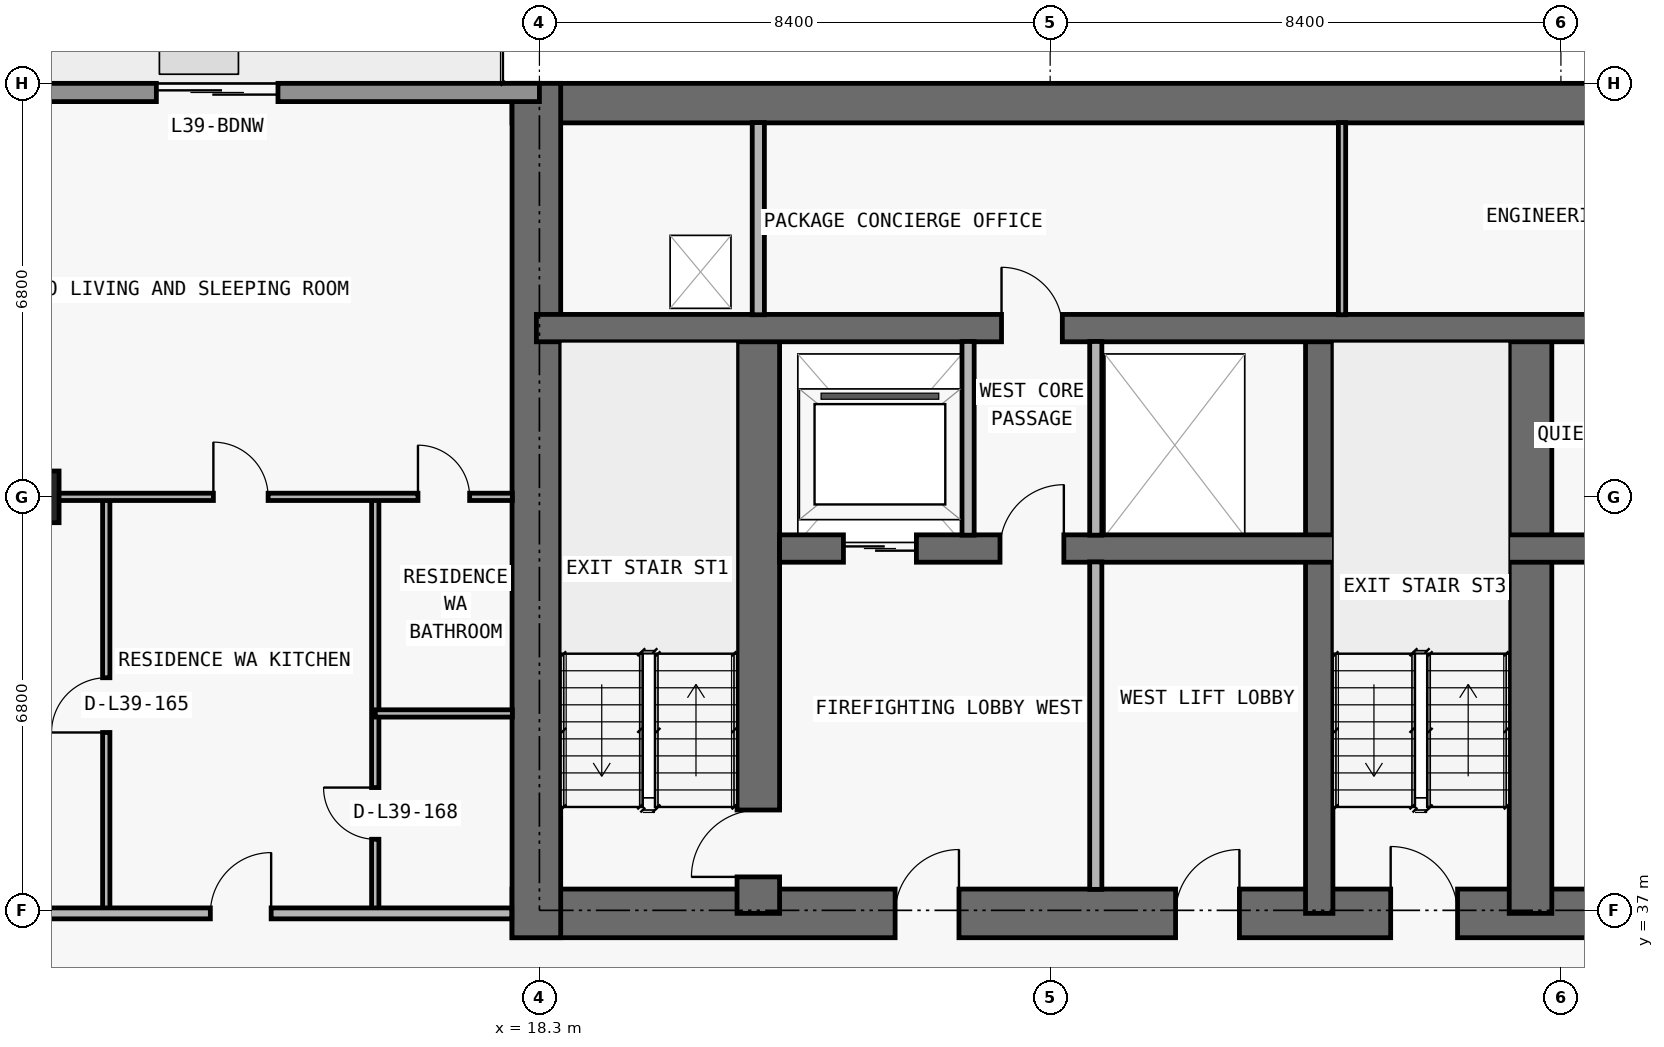
"""IFC4 building model, lengths in metres.
Left out: names, types, materials, properties, quantities, classifications, styles, units other than length and angle.
Written with IfcOpenShell. Run it as: python <this file> out.ifc"""

import sys

from ifc_helpers import new_model, si_unit, direction, frame, frame_2d, origin, origin_2d, place, context, subcontext, project, spatial, rectangle, extrude, element, fill, save


model = new_model("IFC4")
c1 = context("Model", 3, precision=1e-05, world=origin(), true_north=direction((0.0, 1.0)))
c2 = subcontext(c1, "Body", "Model", "MODEL_VIEW")
j1 = project(units=[si_unit("LENGTHUNIT", "METRE"), si_unit("PLANEANGLEUNIT", "RADIAN")], contexts=[c1])
p1 = place(None, origin())
s1 = spatial("IfcSite", under=j1, at=p1, CompositionType="ELEMENT")
p2 = place(p1, origin())
s2 = spatial("IfcBuilding", under=s1, at=p2, CompositionType="ELEMENT")
p3 = place(p2, frame((0.0, 0.0, 142.2)))
s3 = spatial("IfcBuildingStorey", under=s2, at=p3, CompositionType="ELEMENT", Elevation=142.2)
p4 = place(p3, frame((9.9, 43.8, 0.0), z_axis=(0.0, 0.0, 1.0), x_axis=(1.0, 0.0, 0.0)))
e1 = element("IfcColumn", 1, at=p4, inside=s3, PredefinedType="COLUMN", context=c2, shape_type="SweptSolid", body=[
    extrude(rectangle(XDim=1.0, YDim=0.85, at=origin_2d()), origin(), (0.0, 0.0, 1.0), 3.05),
])
p5 = place(p3, frame((17.85, 36.95, 0.0), z_axis=(0.0, 0.0, 1.0), x_axis=(1.0, 0.0, 0.0)))
e2 = element("IfcWall", 2, at=p5, inside=s3, PredefinedType="SHEAR", context=c2, shape_type="SweptSolid", body=[
    extrude(rectangle(XDim=42.1, YDim=0.8, at=frame_2d((21.05, 0.0))), origin(), (0.0, 0.0, 1.0), 3.05),
])
p6 = place(p5, frame((14.45, 0.0, 0.0)))
e3 = element("IfcOpeningElement", 3, at=p6, cuts=e2, PredefinedType="OPENING", context=c2, shape_type="SweptSolid", body=[
    extrude(rectangle(XDim=1.1, YDim=2.15, at=frame_2d((0.55, 1.075))), frame((0.0, 0.41, 0.0), z_axis=(0.0, -1.0, 0.0), x_axis=(1.0, 0.0, 0.0)), (0.0, 0.0, 1.0), 0.82),
])
p7 = place(p5, frame((6.3, 0.0, 0.0)))
e4 = element("IfcOpeningElement", 4, at=p7, cuts=e2, PredefinedType="OPENING", context=c2, shape_type="SweptSolid", body=[
    extrude(rectangle(XDim=1.05, YDim=2.15, at=frame_2d((0.525, 1.075))), frame((0.0, 0.41, 0.0), z_axis=(0.0, -1.0, 0.0), x_axis=(1.0, 0.0, 0.0)), (0.0, 0.0, 1.0), 0.82),
])
p8 = place(p5, frame((34.8, 0.0, 0.0)))
e5 = element("IfcOpeningElement", 5, at=p8, cuts=e2, PredefinedType="OPENING", context=c2, shape_type="SweptSolid", body=[
    extrude(rectangle(XDim=1.05, YDim=2.15, at=frame_2d((0.525, 1.075))), frame((0.0, 0.41, 0.0), z_axis=(0.0, -1.0, 0.0), x_axis=(1.0, 0.0, 0.0)), (0.0, 0.0, 1.0), 0.82),
])
p9 = place(p5, frame((10.913, 0.0, 0.0)))
e6 = element("IfcOpeningElement", 6, at=p9, cuts=e2, PredefinedType="OPENING", context=c2, shape_type="SweptSolid", body=[
    extrude(rectangle(XDim=1.05, YDim=2.15, at=frame_2d((0.525, 1.075))), frame((0.0, 0.41, 0.0), z_axis=(0.0, -1.0, 0.0), x_axis=(1.0, 0.0, 0.0)), (0.0, 0.0, 1.0), 0.82),
])
p10 = place(p5, frame((24.15, 0.0, 0.0)))
e7 = element("IfcOpeningElement", 7, at=p10, cuts=e2, PredefinedType="OPENING", context=c2, shape_type="SweptSolid", body=[
    extrude(rectangle(XDim=1.05, YDim=2.15, at=frame_2d((0.525, 1.075))), frame((0.0, 0.41, 0.0), z_axis=(0.0, -1.0, 0.0), x_axis=(1.0, 0.0, 0.0)), (0.0, 0.0, 1.0), 0.82),
])
p11 = place(p3, frame((17.85, 50.275, 0.0), z_axis=(0.0, 0.0, 1.0), x_axis=(1.0, 0.0, 0.0)))
e8 = element("IfcWall", 8, at=p11, inside=s3, PredefinedType="SHEAR", context=c2, shape_type="SweptSolid", body=[
    extrude(rectangle(XDim=42.1, YDim=0.65, at=frame_2d((21.05, 0.0))), origin(), (0.0, 0.0, 1.0), 3.05),
])
p12 = place(p3, frame((18.25, 36.55, 0.0), z_axis=(0.0, 0.0, 1.0), x_axis=(0.0, 1.0, 0.0)))
e9 = element("IfcWall", 9, at=p12, inside=s3, PredefinedType="SHEAR", context=c2, shape_type="SweptSolid", body=[
    extrude(rectangle(XDim=14.05, YDim=0.8, at=frame_2d((7.025, 0.0))), origin(), (0.0, 0.0, 1.0), 3.05),
])
p13 = place(p3, frame((21.9, 36.95, 0.0), z_axis=(0.0, 0.0, 1.0), x_axis=(0.0, 1.0, 0.0)))
e10 = element("IfcWall", 10, at=p13, inside=s3, PredefinedType="SHEAR", context=c2, shape_type="SweptSolid", body=[
    extrude(rectangle(XDim=9.625, YDim=0.7, at=frame_2d((4.812, 0.0))), origin(), (0.0, 0.0, 1.0), 3.05),
])
p14 = place(p13, frame((0.6, 0.0, 0.0)))
e11 = element("IfcOpeningElement", 11, at=p14, cuts=e10, PredefinedType="OPENING", context=c2, shape_type="SweptSolid", body=[
    extrude(rectangle(XDim=1.1, YDim=2.15, at=frame_2d((0.55, 1.075))), frame((0.0, 0.36, 0.0), z_axis=(0.0, -1.0, 0.0), x_axis=(1.0, 0.0, 0.0)), (0.0, 0.0, 1.0), 0.72),
])
p15 = place(p3, frame((31.125, 36.95, 0.0), z_axis=(0.0, 0.0, 1.0), x_axis=(0.0, 1.0, 0.0)))
e12 = element("IfcWall", 12, at=p15, inside=s3, PredefinedType="SHEAR", context=c2, shape_type="SweptSolid", body=[
    extrude(rectangle(XDim=9.625, YDim=0.45, at=frame_2d((4.812, 0.0))), origin(), (0.0, 0.0, 1.0), 3.05),
])
p16 = place(p3, frame((34.6, 36.95, 0.0), z_axis=(0.0, 0.0, 1.0), x_axis=(0.0, 1.0, 0.0)))
e13 = element("IfcWall", 13, at=p16, inside=s3, PredefinedType="SHEAR", context=c2, shape_type="SweptSolid", body=[
    extrude(rectangle(XDim=9.625, YDim=0.7, at=frame_2d((4.812, 0.0))), origin(), (0.0, 0.0, 1.0), 3.05),
])
p17 = place(p3, frame((22.25, 42.95, 0.0), z_axis=(0.0, 0.0, 1.0), x_axis=(1.0, 0.0, 0.0)))
e14 = element("IfcWall", 14, at=p17, inside=s3, PredefinedType="SHEAR", context=c2, shape_type="SweptSolid", body=[
    extrude(rectangle(XDim=33.3, YDim=0.45, at=frame_2d((16.65, 0.0))), origin(), (0.0, 0.0, 1.0), 3.05),
])
p18 = place(p17, frame((1.05, 0.0, 0.0)))
e15 = element("IfcOpeningElement", 15, at=p18, cuts=e14, PredefinedType="OPENING", context=c2, shape_type="SweptSolid", body=[
    extrude(rectangle(XDim=1.2, YDim=2.2, at=frame_2d((0.6, 1.1))), frame((0.0, 0.235, 0.0), z_axis=(0.0, -1.0, 0.0), x_axis=(1.0, 0.0, 0.0)), (0.0, 0.0, 1.0), 0.47),
])
p19 = place(p17, frame((31.05, 0.0, 0.0)))
e16 = element("IfcOpeningElement", 16, at=p19, cuts=e14, PredefinedType="OPENING", context=c2, shape_type="SweptSolid", body=[
    extrude(rectangle(XDim=1.2, YDim=2.2, at=frame_2d((0.6, 1.1))), frame((0.0, 0.235, 0.0), z_axis=(0.0, -1.0, 0.0), x_axis=(1.0, 0.0, 0.0)), (0.0, 0.0, 1.0), 0.47),
])
p20 = place(p17, frame((21.4, 0.0, 0.0)))
e17 = element("IfcOpeningElement", 17, at=p20, cuts=e14, PredefinedType="OPENING", context=c2, shape_type="SweptSolid", body=[
    extrude(rectangle(XDim=1.1, YDim=2.2, at=frame_2d((0.55, 1.1))), frame((0.0, 0.235, 0.0), z_axis=(0.0, -1.0, 0.0), x_axis=(1.0, 0.0, 0.0)), (0.0, 0.0, 1.0), 0.47),
])
p21 = place(p17, frame((24.0, 0.0, 0.0)))
e18 = element("IfcOpeningElement", 18, at=p21, cuts=e14, PredefinedType="OPENING", context=c2, shape_type="SweptSolid", body=[
    extrude(rectangle(XDim=1.1, YDim=2.2, at=frame_2d((0.55, 1.1))), frame((0.0, 0.235, 0.0), z_axis=(0.0, -1.0, 0.0), x_axis=(1.0, 0.0, 0.0)), (0.0, 0.0, 1.0), 0.47),
])
p22 = place(p17, frame((3.625, 0.0, 0.0)))
e19 = element("IfcOpeningElement", 19, at=p22, cuts=e14, PredefinedType="OPENING", context=c2, shape_type="SweptSolid", body=[
    extrude(rectangle(XDim=1.05, YDim=2.15, at=frame_2d((0.525, 1.075))), frame((0.0, 0.235, 0.0), z_axis=(0.0, -1.0, 0.0), x_axis=(1.0, 0.0, 0.0)), (0.0, 0.0, 1.0), 0.47),
])
p23 = place(p17, frame((28.675, 0.0, 0.0)))
e20 = element("IfcOpeningElement", 20, at=p23, cuts=e14, PredefinedType="OPENING", context=c2, shape_type="SweptSolid", body=[
    extrude(rectangle(XDim=1.05, YDim=2.15, at=frame_2d((0.525, 1.075))), frame((0.0, 0.235, 0.0), z_axis=(0.0, -1.0, 0.0), x_axis=(1.0, 0.0, 0.0)), (0.0, 0.0, 1.0), 0.47),
])
p24 = place(p17, frame((15.975, 0.0, 0.0)))
e21 = element("IfcOpeningElement", 21, at=p24, cuts=e14, PredefinedType="OPENING", context=c2, shape_type="SweptSolid", body=[
    extrude(rectangle(XDim=1.0, YDim=2.2, at=frame_2d((0.5, 1.1))), frame((0.0, 0.235, 0.0), z_axis=(0.0, -1.0, 0.0), x_axis=(1.0, 0.0, 0.0)), (0.0, 0.0, 1.0), 0.47),
])
p25 = place(p3, frame((18.25, 46.575, 0.0), z_axis=(0.0, 0.0, 1.0), x_axis=(1.0, 0.0, 0.0)))
e22 = element("IfcWall", 22, at=p25, inside=s3, PredefinedType="SHEAR", context=c2, shape_type="SweptSolid", body=[
    extrude(rectangle(XDim=41.3, YDim=0.45, at=frame_2d((20.65, 0.0))), origin(), (0.0, 0.0, 1.0), 3.05),
])
p26 = place(p25, frame((7.65, 0.0, 0.0)))
e23 = element("IfcOpeningElement", 23, at=p26, cuts=e22, PredefinedType="OPENING", context=c2, shape_type="SweptSolid", body=[
    extrude(rectangle(XDim=1.0, YDim=2.2, at=frame_2d((0.5, 1.1))), frame((0.0, 0.235, 0.0), z_axis=(0.0, -1.0, 0.0), x_axis=(1.0, 0.0, 0.0)), (0.0, 0.0, 1.0), 0.47),
])
p27 = place(p25, frame((32.675, 0.0, 0.0)))
e24 = element("IfcOpeningElement", 24, at=p27, cuts=e22, PredefinedType="OPENING", context=c2, shape_type="SweptSolid", body=[
    extrude(rectangle(XDim=1.05, YDim=2.15, at=frame_2d((0.525, 1.075))), frame((0.0, 0.235, 0.0), z_axis=(0.0, -1.0, 0.0), x_axis=(1.0, 0.0, 0.0)), (0.0, 0.0, 1.0), 0.47),
])
p28 = place(p3, frame((7.7, 50.45, 0.0), z_axis=(0.0, 0.0, 1.0), x_axis=(1.0, 0.0, 0.0)))
e25 = element("IfcWall", 25, at=p28, inside=s3, PredefinedType="STANDARD", context=c2, shape_type="SweptSolid", body=[
    extrude(rectangle(XDim=10.6, YDim=0.3, at=frame_2d((5.3, 0.0))), origin(), (0.0, 0.0, 1.0), 3.05),
])
p29 = place(p28, frame((4.3, 0.0, 0.0)))
e26 = element("IfcOpeningElement", 26, at=p29, cuts=e25, PredefinedType="OPENING", context=c2, shape_type="SweptSolid", body=[
    extrude(rectangle(XDim=2.0, YDim=2.3, at=frame_2d((1.0, 1.15))), frame((0.0, 0.16, 0.0), z_axis=(0.0, -1.0, 0.0), x_axis=(1.0, 0.0, 0.0)), (0.0, 0.0, 1.0), 0.32),
])
p30 = place(p3, frame((11.176, 36.95, 0.0), z_axis=(0.0, 0.0, 1.0), x_axis=(0.0, 1.0, 0.0)))
e27 = element("IfcWall", 27, at=p30, inside=s3, PredefinedType="PARTITIONING", context=c2, shape_type="SweptSolid", body=[
    extrude(rectangle(XDim=6.85, YDim=0.12, at=frame_2d((3.425, 0.0))), origin(), (0.0, 0.0, 1.0), 3.05),
])
p31 = place(p30, frame((2.975, 0.0, 0.0)))
e28 = element("IfcOpeningElement", 28, at=p31, cuts=e27, PredefinedType="OPENING", context=c2, shape_type="SweptSolid", body=[
    extrude(rectangle(XDim=0.9, YDim=2.15, at=frame_2d((0.45, 1.075))), frame((0.0, 0.07, 0.0), z_axis=(0.0, -1.0, 0.0), x_axis=(1.0, 0.0, 0.0)), (0.0, 0.0, 1.0), 0.14),
])
p32 = place(p3, frame((15.6, 36.95, 0.0), z_axis=(0.0, 0.0, 1.0), x_axis=(0.0, 1.0, 0.0)))
e29 = element("IfcWall", 29, at=p32, inside=s3, PredefinedType="PARTITIONING", context=c2, shape_type="SweptSolid", body=[
    extrude(rectangle(XDim=6.85, YDim=0.12, at=frame_2d((3.425, 0.0))), origin(), (0.0, 0.0, 1.0), 3.05),
])
p33 = place(p32, frame((1.219, 0.0, 0.0)))
e30 = element("IfcOpeningElement", 30, at=p33, cuts=e29, PredefinedType="OPENING", context=c2, shape_type="SweptSolid", body=[
    extrude(rectangle(XDim=0.85, YDim=2.1, at=frame_2d((0.425, 1.05))), frame((0.0, 0.07, 0.0), z_axis=(0.0, -1.0, 0.0), x_axis=(1.0, 0.0, 0.0)), (0.0, 0.0, 1.0), 0.14),
])
p34 = place(p3, frame((21.9, 46.795, 0.0), z_axis=(0.0, 0.0, 1.0), x_axis=(0.0, 1.0, 0.0)))
e31 = element("IfcWall", 31, at=p34, inside=s3, PredefinedType="PARTITIONING", context=c2, shape_type="SweptSolid", body=[
    extrude(rectangle(XDim=3.16, YDim=0.2, at=frame_2d((1.58, 0.0))), origin(), (0.0, 0.0, 1.0), 3.05),
])
p35 = place(p3, frame((25.35, 43.17, 0.0), z_axis=(0.0, 0.0, 1.0), x_axis=(0.0, 1.0, 0.0)))
e32 = element("IfcWall", 32, at=p35, inside=s3, PredefinedType="PARTITIONING", context=c2, shape_type="SweptSolid", body=[
    extrude(rectangle(XDim=3.185, YDim=0.2, at=frame_2d((1.593, 0.0))), origin(), (0.0, 0.0, 1.0), 3.05),
])
p36 = place(p3, frame((27.45, 37.345, 0.0), z_axis=(0.0, 0.0, 1.0), x_axis=(0.0, 1.0, 0.0)))
e33 = element("IfcWall", 33, at=p36, inside=s3, PredefinedType="PARTITIONING", context=c2, shape_type="SweptSolid", body=[
    extrude(rectangle(XDim=5.385, YDim=0.2, at=frame_2d((2.692, 0.0))), origin(), (0.0, 0.0, 1.0), 3.05),
])
p37 = place(p3, frame((27.45, 43.17, 0.0), z_axis=(0.0, 0.0, 1.0), x_axis=(0.0, 1.0, 0.0)))
e34 = element("IfcWall", 34, at=p37, inside=s3, PredefinedType="PARTITIONING", context=c2, shape_type="SweptSolid", body=[
    extrude(rectangle(XDim=3.185, YDim=0.2, at=frame_2d((1.593, 0.0))), origin(), (0.0, 0.0, 1.0), 3.05),
])
p38 = place(p3, frame((31.5, 46.795, 0.0), z_axis=(0.0, 0.0, 1.0), x_axis=(0.0, 1.0, 0.0)))
e35 = element("IfcWall", 35, at=p38, inside=s3, PredefinedType="PARTITIONING", context=c2, shape_type="SweptSolid", body=[
    extrude(rectangle(XDim=3.16, YDim=0.12, at=frame_2d((1.58, 0.0))), origin(), (0.0, 0.0, 1.0), 3.05),
])
p39 = place(p3, frame((7.7, 36.95, 0.0), z_axis=(0.0, 0.0, 1.0), x_axis=(1.0, 0.0, 0.0)))
e36 = element("IfcWall", 36, at=p39, inside=s3, PredefinedType="PARTITIONING", context=c2, shape_type="SweptSolid", body=[
    extrude(rectangle(XDim=10.145, YDim=0.18, at=frame_2d((5.073, 0.0))), origin(), (0.0, 0.0, 1.0), 3.05),
])
p40 = place(p39, frame((5.188, 0.0, 0.0)))
e37 = element("IfcOpeningElement", 37, at=p40, cuts=e36, PredefinedType="OPENING", context=c2, shape_type="SweptSolid", body=[
    extrude(rectangle(XDim=1.0, YDim=2.2, at=frame_2d((0.5, 1.1))), frame((0.0, 0.1, 0.0), z_axis=(0.0, -1.0, 0.0), x_axis=(1.0, 0.0, 0.0)), (0.0, 0.0, 1.0), 0.2),
])
p41 = place(p3, frame((15.6, 40.238, 0.0), z_axis=(0.0, 0.0, 1.0), x_axis=(1.0, 0.0, 0.0)))
e38 = element("IfcWall", 38, at=p41, inside=s3, PredefinedType="PARTITIONING", context=c2, shape_type="SweptSolid", body=[
    extrude(rectangle(XDim=2.255, YDim=0.12, at=frame_2d((1.127, 0.0))), origin(), (0.0, 0.0, 1.0), 3.05),
])
p42 = place(p3, frame((4.195, 43.8, 0.0), z_axis=(0.0, 0.0, 1.0), x_axis=(1.0, 0.0, 0.0)))
e39 = element("IfcWall", 39, at=p42, inside=s3, PredefinedType="PARTITIONING", context=c2, shape_type="SweptSolid", body=[
    extrude(rectangle(XDim=13.66, YDim=0.12, at=frame_2d((6.83, 0.0))), origin(), (0.0, 0.0, 1.0), 2.339),
])
p43 = place(p42, frame((8.743, 0.0, 0.0)))
e40 = element("IfcOpeningElement", 40, at=p43, cuts=e39, PredefinedType="OPENING", context=c2, shape_type="SweptSolid", body=[
    extrude(rectangle(XDim=0.9, YDim=2.15, at=frame_2d((0.45, 1.075))), frame((0.0, 0.07, 0.0), z_axis=(0.0, -1.0, 0.0), x_axis=(1.0, 0.0, 0.0)), (0.0, 0.0, 1.0), 0.14),
])
p44 = place(p42, frame((12.107, 0.0, 0.0)))
e41 = element("IfcOpeningElement", 41, at=p44, cuts=e39, PredefinedType="OPENING", context=c2, shape_type="SweptSolid", body=[
    extrude(rectangle(XDim=0.85, YDim=2.1, at=frame_2d((0.425, 1.05))), frame((0.0, 0.07, 0.0), z_axis=(0.0, -1.0, 0.0), x_axis=(1.0, 0.0, 0.0)), (0.0, 0.0, 1.0), 0.14),
])
p45 = place(p29, origin())
e42 = element("IfcDoor", 42, at=p45, inside=s3, OperationType="DOUBLE_DOOR_SLIDING", PredefinedType="DOOR", context=c2, shape_type="SweptSolid", body=[
    extrude(rectangle(XDim=2.0, YDim=2.3, at=frame_2d((1.0, 1.15))), frame((0.0, 0.025, 0.0), z_axis=(0.0, -1.0, 0.0), x_axis=(1.0, 0.0, 0.0)), (0.0, 0.0, 1.0), 0.05),
])
fill(e26, e42)
p46 = place(p18, origin())
e43 = element("IfcDoor", 43, at=p46, inside=s3, OperationType="DOUBLE_DOOR_SLIDING", PredefinedType="DOOR", context=c2, shape_type="SweptSolid", body=[
    extrude(rectangle(XDim=1.2, YDim=2.2, at=frame_2d((0.6, 1.1))), frame((0.0, 0.025, 0.0), z_axis=(0.0, -1.0, 0.0), x_axis=(1.0, 0.0, 0.0)), (0.0, 0.0, 1.0), 0.05),
])
fill(e15, e43)
p47 = place(p6, origin())
e44 = element("IfcDoor", 44, at=p47, inside=s3, OperationType="SINGLE_SWING_LEFT", PredefinedType="DOOR", context=c2, shape_type="SweptSolid", body=[
    extrude(rectangle(XDim=1.1, YDim=2.15, at=frame_2d((0.55, 1.075))), frame((0.0, 0.025, 0.0), z_axis=(0.0, -1.0, 0.0), x_axis=(1.0, 0.0, 0.0)), (0.0, 0.0, 1.0), 0.05),
])
fill(e3, e44)
p48 = place(p7, origin())
e45 = element("IfcDoor", 45, at=p48, inside=s3, OperationType="SINGLE_SWING_RIGHT", PredefinedType="DOOR", context=c2, shape_type="SweptSolid", body=[
    extrude(rectangle(XDim=1.05, YDim=2.15, at=frame_2d((0.525, 1.075))), frame((0.0, 0.025, 0.0), z_axis=(0.0, -1.0, 0.0), x_axis=(1.0, 0.0, 0.0)), (0.0, 0.0, 1.0), 0.05),
])
fill(e4, e45)
p49 = place(p14, origin())
e46 = element("IfcDoor", 46, at=p49, inside=s3, OperationType="SINGLE_SWING_LEFT", PredefinedType="DOOR", context=c2, shape_type="SweptSolid", body=[
    extrude(rectangle(XDim=1.1, YDim=2.15, at=frame_2d((0.55, 1.075))), frame((0.0, 0.025, 0.0), z_axis=(0.0, -1.0, 0.0), x_axis=(1.0, 0.0, 0.0)), (0.0, 0.0, 1.0), 0.05),
])
fill(e11, e46)
p50 = place(p22, origin())
e47 = element("IfcDoor", 47, at=p50, inside=s3, OperationType="SINGLE_SWING_RIGHT", PredefinedType="DOOR", context=c2, shape_type="SweptSolid", body=[
    extrude(rectangle(XDim=1.05, YDim=2.15, at=frame_2d((0.525, 1.075))), frame((0.0, 0.025, 0.0), z_axis=(0.0, -1.0, 0.0), x_axis=(1.0, 0.0, 0.0)), (0.0, 0.0, 1.0), 0.05),
])
fill(e19, e47)
p51 = place(p9, origin())
e48 = element("IfcDoor", 48, at=p51, inside=s3, OperationType="SINGLE_SWING_RIGHT", PredefinedType="DOOR", context=c2, shape_type="SweptSolid", body=[
    extrude(rectangle(XDim=1.05, YDim=2.15, at=frame_2d((0.525, 1.075))), frame((0.0, 0.025, 0.0), z_axis=(0.0, -1.0, 0.0), x_axis=(1.0, 0.0, 0.0)), (0.0, 0.0, 1.0), 0.05),
])
fill(e6, e48)
p52 = place(p26, origin())
e49 = element("IfcDoor", 49, at=p52, inside=s3, OperationType="SINGLE_SWING_LEFT", PredefinedType="DOOR", context=c2, shape_type="SweptSolid", body=[
    extrude(rectangle(XDim=1.0, YDim=2.2, at=frame_2d((0.5, 1.1))), frame((0.0, 0.025, 0.0), z_axis=(0.0, -1.0, 0.0), x_axis=(1.0, 0.0, 0.0)), (0.0, 0.0, 1.0), 0.05),
])
fill(e23, e49)
p53 = place(p31, origin())
e50 = element("IfcDoor", 50, at=p53, inside=s3, OperationType="SINGLE_SWING_LEFT", PredefinedType="DOOR", context=c2, shape_type="SweptSolid", body=[
    extrude(rectangle(XDim=0.9, YDim=2.15, at=frame_2d((0.45, 1.075))), frame((0.0, 0.025, 0.0), z_axis=(0.0, -1.0, 0.0), x_axis=(1.0, 0.0, 0.0)), (0.0, 0.0, 1.0), 0.05),
])
fill(e28, e50)
p54 = place(p40, origin())
e51 = element("IfcDoor", 51, at=p54, inside=s3, OperationType="SINGLE_SWING_RIGHT", PredefinedType="DOOR", context=c2, shape_type="SweptSolid", body=[
    extrude(rectangle(XDim=1.0, YDim=2.2, at=frame_2d((0.5, 1.1))), frame((0.0, 0.025, 0.0), z_axis=(0.0, -1.0, 0.0), x_axis=(1.0, 0.0, 0.0)), (0.0, 0.0, 1.0), 0.05),
])
fill(e37, e51)
p55 = place(p43, origin())
e52 = element("IfcDoor", 52, at=p55, inside=s3, OperationType="SINGLE_SWING_LEFT", PredefinedType="DOOR", context=c2, shape_type="SweptSolid", body=[
    extrude(rectangle(XDim=0.9, YDim=2.15, at=frame_2d((0.45, 1.075))), frame((0.0, 0.025, 0.0), z_axis=(0.0, -1.0, 0.0), x_axis=(1.0, 0.0, 0.0)), (0.0, 0.0, 1.0), 0.05),
])
fill(e40, e52)
p56 = place(p33, origin())
e53 = element("IfcDoor", 53, at=p56, inside=s3, OperationType="SINGLE_SWING_RIGHT", PredefinedType="DOOR", context=c2, shape_type="SweptSolid", body=[
    extrude(rectangle(XDim=0.85, YDim=2.1, at=frame_2d((0.425, 1.05))), frame((0.0, 0.025, 0.0), z_axis=(0.0, -1.0, 0.0), x_axis=(1.0, 0.0, 0.0)), (0.0, 0.0, 1.0), 0.05),
])
fill(e30, e53)
p57 = place(p44, origin())
e54 = element("IfcDoor", 54, at=p57, inside=s3, OperationType="SINGLE_SWING_LEFT", PredefinedType="DOOR", context=c2, shape_type="SweptSolid", body=[
    extrude(rectangle(XDim=0.85, YDim=2.1, at=frame_2d((0.425, 1.05))), frame((0.0, 0.025, 0.0), z_axis=(0.0, -1.0, 0.0), x_axis=(1.0, 0.0, 0.0)), (0.0, 0.0, 1.0), 0.05),
])
fill(e41, e54)
save(model, sys.argv[1])
